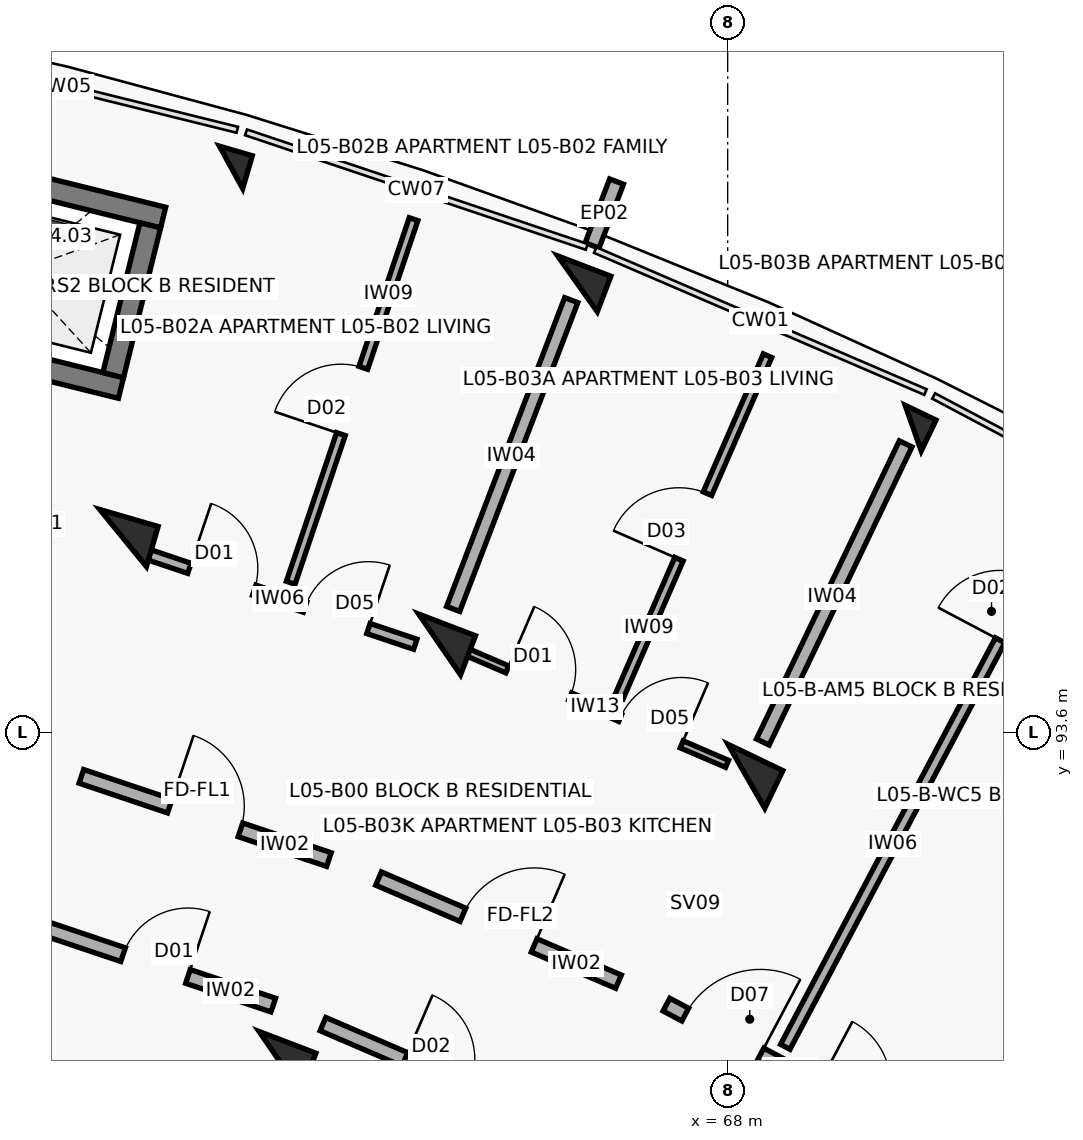
"""IFC4 building model, lengths in metres.
Left out: names, types, materials, properties, quantities, classifications, styles, units other than length and angle.
Written with IfcOpenShell. Run it as: python <this file> out.ifc"""

import sys

from ifc_helpers import new_model, si_unit, direction, frame, frame_2d, origin, origin_2d, place, context, subcontext, project, spatial, rectangle, extrude, element, fill, save


model = new_model("IFC4")
c1 = context("Model", 3, precision=1e-05, world=origin(), true_north=direction((0.0, 1.0)))
c2 = subcontext(c1, "Body", "Model", "MODEL_VIEW")
j1 = project(units=[si_unit("LENGTHUNIT", "METRE"), si_unit("PLANEANGLEUNIT", "RADIAN")], contexts=[c1])
p1 = place(None, origin())
s1 = spatial("IfcSite", under=j1, at=p1, CompositionType="ELEMENT")
p2 = place(p1, origin())
s2 = spatial("IfcBuilding", under=s1, at=p2, CompositionType="ELEMENT")
p3 = place(p2, frame((0.0, 0.0, 17.4)))
s3 = spatial("IfcBuildingStorey", under=s2, at=p3, CompositionType="ELEMENT", Elevation=17.4)
p4 = place(p3, frame((60.046, 96.153, 0.0), z_axis=(0.0, 0.0, 1.0), x_axis=(0.27966144946, 0.96009867914, 0.0)))
e1 = element("IfcColumn", 1, at=p4, inside=s3, PredefinedType="COLUMN", context=c2, shape_type="SweptSolid", body=[
    extrude(rectangle(XDim=0.55, YDim=0.8, at=origin_2d()), origin(), (0.0, 0.0, 1.0), 3.1),
])
p5 = place(p3, frame((61.467, 101.031, 0.0), z_axis=(0.0, 0.0, 1.0), x_axis=(0.27966144946, 0.96009867914, 0.0)))
e2 = element("IfcColumn", 2, at=p5, inside=s3, PredefinedType="COLUMN", context=c2, shape_type="SweptSolid", body=[
    extrude(rectangle(XDim=0.45, YDim=0.45, at=origin_2d()), origin(), (0.0, 0.0, 1.0), 3.1),
])
for number, where, z_axis, x_axis in (
    (3, (62.111, 89.261, 0.0), (0.0, 0.0, 1.0), (0.357, 0.934, 0.0)),
    (4, (64.21, 94.753, 0.0), (0.0, 0.0, 1.0), (0.357, 0.934, 0.0)),
):
    element("IfcColumn", number, at=place(p3, frame(where, z_axis=z_axis, x_axis=x_axis)), inside=s3, PredefinedType="COLUMN", context=c2, shape_type="SweptSolid", body=[
        extrude(rectangle(XDim=0.55, YDim=0.8, at=origin_2d()), origin(), (0.0, 0.0, 1.0), 3.1),
    ])
p6 = place(p3, frame((66.024, 99.499, 0.0), z_axis=(0.0, 0.0, 1.0), x_axis=(0.357064076459, 0.934079892355, 0.0)))
e5 = element("IfcColumn", 5, at=p6, inside=s3, PredefinedType="COLUMN", context=c2, shape_type="SweptSolid", body=[
    extrude(rectangle(XDim=0.5, YDim=0.75, at=origin_2d()), origin(), (0.0, 0.0, 1.0), 3.1),
])
p7 = place(p3, frame((68.246, 93.019, 0.0), z_axis=(0.0, 0.0, 1.0), x_axis=(0.432085748802, 0.901832526405, 0.0)))
e6 = element("IfcColumn", 6, at=p7, inside=s3, PredefinedType="COLUMN", context=c2, shape_type="SweptSolid", body=[
    extrude(rectangle(XDim=0.55, YDim=0.8, at=origin_2d()), origin(), (0.0, 0.0, 1.0), 3.1),
])
p8 = place(p3, frame((70.441, 97.6, 0.0), z_axis=(0.0, 0.0, 1.0), x_axis=(0.432085748802, 0.901832526405, 0.0)))
e7 = element("IfcColumn", 7, at=p8, inside=s3, PredefinedType="COLUMN", context=c2, shape_type="SweptSolid", body=[
    extrude(rectangle(XDim=0.45, YDim=0.45, at=origin_2d()), origin(), (0.0, 0.0, 1.0), 3.1),
])
p9 = place(p3, frame((66.217, 100.003, 0.0), z_axis=(0.0, 0.0, 1.0), x_axis=(0.356942580168, 0.934126326823, 0.0)))
e8 = element("IfcWall", 8, at=p9, inside=s3, PredefinedType="PARAPET", context=c2, shape_type="SweptSolid", body=[
    extrude(rectangle(XDim=0.9, YDim=0.195, at=frame_2d((0.45, 0.0))), origin(), (0.0, 0.0, 1.0), 2.25),
])
p10 = place(p3, frame((60.018, 98.128, 0.0), z_axis=(0.0, 0.0, 1.0), x_axis=(-0.970707542441, 0.240264160972, 0.0)))
e9 = element("IfcWall", 9, at=p10, inside=s3, PredefinedType="SHEAR", context=c2, shape_type="SweptSolid", body=[
    extrude(rectangle(XDim=3.39, YDim=0.28, at=frame_2d((1.695, 0.0))), origin(), (0.0, 0.0, 1.0), 3.1),
])
p11 = place(p10, frame((1.095, 0.0, 0.0)))
e10 = element("IfcOpeningElement", 10, at=p11, cuts=e9, PredefinedType="OPENING", context=c2, shape_type="SweptSolid", body=[
    extrude(rectangle(XDim=1.2, YDim=2.15, at=frame_2d((0.6, 1.075))), frame((0.0, 0.15, 0.0), z_axis=(0.0, -1.0, 0.0), x_axis=(1.0, 0.0, 0.0)), (0.0, 0.0, 1.0), 0.3),
])
p12 = place(p3, frame((60.573, 100.37, 0.0), z_axis=(0.0, 0.0, 1.0), x_axis=(-0.970711699588, 0.240247364777, 0.0)))
e11 = element("IfcWall", 11, at=p12, inside=s3, PredefinedType="SHEAR", context=c2, shape_type="SweptSolid", body=[
    extrude(rectangle(XDim=3.39, YDim=0.28, at=frame_2d((1.695, 0.0))), origin(), (0.0, 0.0, 1.0), 3.1),
])
p13 = place(p3, frame((59.915, 98.297, 0.0), z_axis=(0.0, 0.0, 1.0), x_axis=(0.2402993748, 0.970698825832, 0.0)))
e12 = element("IfcWall", 12, at=p13, inside=s3, PredefinedType="SHEAR", context=c2, shape_type="SweptSolid", body=[
    extrude(rectangle(XDim=2.03, YDim=0.28, at=frame_2d((1.015, 0.0))), origin(), (0.0, 0.0, 1.0), 3.1),
])
p14 = place(p3, frame((59.497, 93.018, 0.0), z_axis=(0.0, 0.0, 1.0), x_axis=(0.947863007629, -0.318678080151, 0.0)))
e13 = element("IfcWall", 13, at=p14, inside=s3, PredefinedType="SOLIDWALL", context=c2, shape_type="SweptSolid", body=[
    extrude(rectangle(XDim=3.436, YDim=0.19, at=frame_2d((1.718, 0.0))), origin(), (0.0, 0.0, 1.0), 2.08),
])
p15 = place(p14, frame((1.228, 0.0, 0.0)))
e14 = element("IfcOpeningElement", 14, at=p15, cuts=e13, PredefinedType="OPENING", context=c2, shape_type="SweptSolid", body=[
    extrude(rectangle(XDim=0.98, YDim=2.15, at=frame_2d((0.49, 1.075))), frame((0.0, 0.105, 0.0), z_axis=(0.0, -1.0, 0.0), x_axis=(1.0, 0.0, 0.0)), (0.0, 0.0, 1.0), 0.21),
])
p16 = place(p3, frame((58.923, 91.049, 0.0), z_axis=(0.0, 0.0, 1.0), x_axis=(0.94787351033, -0.318646839643, 0.0)))
e15 = element("IfcWall", 15, at=p16, inside=s3, PredefinedType="SOLIDWALL", context=c2, shape_type="SweptSolid", body=[
    extrude(rectangle(XDim=3.269, YDim=0.19, at=frame_2d((1.634, 0.0))), origin(), (0.0, 0.0, 1.0), 2.08),
])
p17 = place(p16, frame((1.184, 0.0, 0.0)))
e16 = element("IfcOpeningElement", 16, at=p17, cuts=e15, PredefinedType="OPENING", context=c2, shape_type="SweptSolid", body=[
    extrude(rectangle(XDim=0.9, YDim=2.1, at=frame_2d((0.45, 1.05))), frame((0.0, 0.105, 0.0), z_axis=(0.0, -1.0, 0.0), x_axis=(1.0, 0.0, 0.0)), (0.0, 0.0, 1.0), 0.21),
])
p18 = place(p3, frame((60.302, 95.962, 0.0), z_axis=(0.0, 0.0, 1.0), x_axis=(0.947873924847, -0.318645606584, 0.0)))
e17 = element("IfcWall", 17, at=p18, inside=s3, PredefinedType="PARTITIONING", context=c2, shape_type="SweptSolid", body=[
    extrude(rectangle(XDim=3.785, YDim=0.14, at=frame_2d((1.893, 0.0))), origin(), (0.0, 0.0, 1.0), 2.08),
])
p19 = place(p18, frame((0.65, 0.0, 0.0)))
e18 = element("IfcOpeningElement", 18, at=p19, cuts=e17, PredefinedType="OPENING", context=c2, shape_type="SweptSolid", body=[
    extrude(rectangle(XDim=0.9, YDim=2.1, at=frame_2d((0.45, 1.05))), frame((0.0, 0.08, 0.0), z_axis=(0.0, -1.0, 0.0), x_axis=(1.0, 0.0, 0.0)), (0.0, 0.0, 1.0), 0.16),
])
p20 = place(p18, frame((2.255, 0.0, 0.0)))
e19 = element("IfcOpeningElement", 19, at=p20, cuts=e17, PredefinedType="OPENING", context=c2, shape_type="SweptSolid", body=[
    extrude(rectangle(XDim=0.88, YDim=2.1, at=frame_2d((0.44, 1.05))), frame((0.0, 0.08, 0.0), z_axis=(0.0, -1.0, 0.0), x_axis=(1.0, 0.0, 0.0)), (0.0, 0.0, 1.0), 0.16),
])
p21 = place(p3, frame((62.251, 95.565, 0.0), z_axis=(0.0, 0.0, 1.0), x_axis=(0.32008297059, 0.94738951437, 0.0)))
e20 = element("IfcWall", 20, at=p21, inside=s3, PredefinedType="PARTITIONING", context=c2, shape_type="SweptSolid", body=[
    extrude(rectangle(XDim=5.05, YDim=0.12, at=frame_2d((2.525, 0.0))), origin(), (0.0, 0.0, 1.0), 2.08),
])
p22 = place(p21, frame((2.065, 0.0, 0.0)))
e21 = element("IfcOpeningElement", 21, at=p22, cuts=e20, PredefinedType="OPENING", context=c2, shape_type="SweptSolid", body=[
    extrude(rectangle(XDim=0.92, YDim=2.1, at=frame_2d((0.46, 1.05))), frame((0.0, 0.07, 0.0), z_axis=(0.0, -1.0, 0.0), x_axis=(1.0, 0.0, 0.0)), (0.0, 0.0, 1.0), 0.14),
])
p23 = place(p3, frame((63.407, 91.673, 0.0), z_axis=(0.0, 0.0, 1.0), x_axis=(0.918718172399, -0.394913813008, 0.0)))
e22 = element("IfcWall", 22, at=p23, inside=s3, PredefinedType="SOLIDWALL", context=c2, shape_type="SweptSolid", body=[
    extrude(rectangle(XDim=3.436, YDim=0.19, at=frame_2d((1.718, 0.0))), origin(), (0.0, 0.0, 1.0), 2.08),
])
p24 = place(p23, frame((1.208, 0.0, 0.0)))
e23 = element("IfcOpeningElement", 23, at=p24, cuts=e22, PredefinedType="OPENING", context=c2, shape_type="SweptSolid", body=[
    extrude(rectangle(XDim=1.02, YDim=2.15, at=frame_2d((0.51, 1.075))), frame((0.0, 0.105, 0.0), z_axis=(0.0, -1.0, 0.0), x_axis=(1.0, 0.0, 0.0)), (0.0, 0.0, 1.0), 0.21),
])
p25 = place(p3, frame((62.675, 89.758, 0.0), z_axis=(0.0, 0.0, 1.0), x_axis=(0.918723391052, -0.394901672235, 0.0)))
e24 = element("IfcWall", 24, at=p25, inside=s3, PredefinedType="SOLIDWALL", context=c2, shape_type="SweptSolid", body=[
    extrude(rectangle(XDim=3.269, YDim=0.19, at=frame_2d((1.634, 0.0))), origin(), (0.0, 0.0, 1.0), 2.08),
])
p26 = place(p25, frame((1.174, 0.0, 0.0)))
e25 = element("IfcOpeningElement", 25, at=p26, cuts=e24, PredefinedType="OPENING", context=c2, shape_type="SweptSolid", body=[
    extrude(rectangle(XDim=0.92, YDim=2.1, at=frame_2d((0.46, 1.05))), frame((0.0, 0.105, 0.0), z_axis=(0.0, -1.0, 0.0), x_axis=(1.0, 0.0, 0.0)), (0.0, 0.0, 1.0), 0.21),
])
p27 = place(p3, frame((64.503, 94.682, 0.0), z_axis=(0.0, 0.0, 1.0), x_axis=(0.918732171064, -0.394881245253, 0.0)))
e26 = element("IfcWall", 26, at=p27, inside=s3, PredefinedType="PARTITIONING", context=c2, shape_type="SweptSolid", body=[
    extrude(rectangle(XDim=3.797, YDim=0.1, at=frame_2d((1.899, 0.0))), origin(), (0.0, 0.0, 1.0), 2.08),
])
p28 = place(p27, frame((0.65, 0.0, 0.0)))
e27 = element("IfcOpeningElement", 27, at=p28, cuts=e26, PredefinedType="OPENING", context=c2, shape_type="SweptSolid", body=[
    extrude(rectangle(XDim=0.9, YDim=2.1, at=frame_2d((0.45, 1.05))), frame((0.0, 0.06, 0.0), z_axis=(0.0, -1.0, 0.0), x_axis=(1.0, 0.0, 0.0)), (0.0, 0.0, 1.0), 0.12),
])
p29 = place(p27, frame((2.267, 0.0, 0.0)))
e28 = element("IfcOpeningElement", 28, at=p29, cuts=e26, PredefinedType="OPENING", context=c2, shape_type="SweptSolid", body=[
    extrude(rectangle(XDim=0.88, YDim=2.1, at=frame_2d((0.44, 1.05))), frame((0.0, 0.06, 0.0), z_axis=(0.0, -1.0, 0.0), x_axis=(1.0, 0.0, 0.0)), (0.0, 0.0, 1.0), 0.12),
])
p30 = place(p3, frame((66.569, 94.06, 0.0), z_axis=(0.0, 0.0, 1.0), x_axis=(0.399048563147, 0.916929792433, 0.0)))
e29 = element("IfcWall", 29, at=p30, inside=s3, PredefinedType="PARTITIONING", context=c2, shape_type="SweptSolid", body=[
    extrude(rectangle(XDim=4.9, YDim=0.12, at=frame_2d((2.45, 0.0))), origin(), (0.0, 0.0, 1.0), 2.08),
])
p31 = place(p30, frame((1.98, 0.0, 0.0)))
e30 = element("IfcOpeningElement", 30, at=p31, cuts=e29, PredefinedType="OPENING", context=c2, shape_type="SweptSolid", body=[
    extrude(rectangle(XDim=0.94, YDim=2.1, at=frame_2d((0.47, 1.05))), frame((0.0, 0.07, 0.0), z_axis=(0.0, -1.0, 0.0), x_axis=(1.0, 0.0, 0.0)), (0.0, 0.0, 1.0), 0.14),
])
p32 = place(p3, frame((64.389, 95.22, 0.0), z_axis=(0.0, 0.0, 1.0), x_axis=(0.357064016205, 0.934079915388, 0.0)))
e31 = element("IfcWall", 31, at=p32, inside=s3, PredefinedType="SOLIDWALL", context=c2, shape_type="SweptSolid", body=[
    extrude(rectangle(XDim=4.35, YDim=0.185, at=frame_2d((2.175, 0.0))), origin(), (0.0, 0.0, 1.0), 2.08),
])
p33 = place(p3, frame((67.194, 90.014, 0.0), z_axis=(0.0, 0.0, 1.0), x_axis=(0.883410853063, -0.468599258099, 0.0)))
e32 = element("IfcWall", 32, at=p33, inside=s3, PredefinedType="SOLIDWALL", context=c2, shape_type="SweptSolid", body=[
    extrude(rectangle(XDim=3.436, YDim=0.19, at=frame_2d((1.718, 0.0))), origin(), (0.0, 0.0, 1.0), 2.08),
])
p34 = place(p33, frame((0.28, 0.0, 0.0)))
e33 = element("IfcOpeningElement", 33, at=p34, cuts=e32, PredefinedType="OPENING", context=c2, shape_type="SweptSolid", body=[
    extrude(rectangle(XDim=1.12, YDim=2.15, at=frame_2d((0.56, 1.075))), frame((0.0, 0.105, 0.0), z_axis=(0.0, -1.0, 0.0), x_axis=(1.0, 0.0, 0.0)), (0.0, 0.0, 1.0), 0.21),
])
p35 = place(p33, frame((2.266, 0.0, 0.0)))
e34 = element("IfcOpeningElement", 34, at=p35, cuts=e32, PredefinedType="OPENING", context=c2, shape_type="SweptSolid", body=[
    extrude(rectangle(XDim=0.95, YDim=2.1, at=frame_2d((0.475, 1.05))), frame((0.0, 0.105, 0.0), z_axis=(0.0, -1.0, 0.0), x_axis=(1.0, 0.0, 0.0)), (0.0, 0.0, 1.0), 0.21),
])
p36 = place(p3, frame((68.758, 89.459, 0.0), z_axis=(0.0, 0.0, 1.0), x_axis=(0.467208910392, 0.884146952746, 0.0)))
e35 = element("IfcWall", 35, at=p36, inside=s3, PredefinedType="PARTITIONING", context=c2, shape_type="SweptSolid", body=[
    extrude(rectangle(XDim=7.95, YDim=0.14, at=frame_2d((3.975, 0.0))), origin(), (0.0, 0.0, 1.0), 2.08),
])
p37 = place(p36, frame((6.05, 0.0, 0.0)))
e36 = element("IfcOpeningElement", 36, at=p37, cuts=e35, PredefinedType="OPENING", context=c2, shape_type="SweptSolid", body=[
    extrude(rectangle(XDim=0.92, YDim=2.1, at=frame_2d((0.46, 1.05))), frame((0.0, 0.08, 0.0), z_axis=(0.0, -1.0, 0.0), x_axis=(1.0, 0.0, 0.0)), (0.0, 0.0, 1.0), 0.16),
])
p38 = place(p3, frame((68.462, 93.469, 0.0), z_axis=(0.0, 0.0, 1.0), x_axis=(0.432086898897, 0.901831975371, 0.0)))
e37 = element("IfcWall", 37, at=p38, inside=s3, PredefinedType="SOLIDWALL", context=c2, shape_type="SweptSolid", body=[
    extrude(rectangle(XDim=4.35, YDim=0.185, at=frame_2d((2.175, 0.0))), origin(), (0.0, 0.0, 1.0), 2.08),
])
p39 = place(p15, origin())
e38 = element("IfcDoor", 38, at=p39, inside=s3, OperationType="SINGLE_SWING_LEFT", PredefinedType="DOOR", context=c2, shape_type="SweptSolid", body=[
    extrude(rectangle(XDim=0.98, YDim=2.15, at=frame_2d((0.49, 1.075))), frame((0.0, 0.025, 0.0), z_axis=(0.0, -1.0, 0.0), x_axis=(1.0, 0.0, 0.0)), (0.0, 0.0, 1.0), 0.05),
])
fill(e14, e38)
p40 = place(p17, origin())
e39 = element("IfcDoor", 39, at=p40, inside=s3, OperationType="SINGLE_SWING_RIGHT", PredefinedType="DOOR", context=c2, shape_type="SweptSolid", body=[
    extrude(rectangle(XDim=0.9, YDim=2.1, at=frame_2d((0.45, 1.05))), frame((0.0, 0.025, 0.0), z_axis=(0.0, -1.0, 0.0), x_axis=(1.0, 0.0, 0.0)), (0.0, 0.0, 1.0), 0.05),
])
fill(e16, e39)
p41 = place(p19, origin())
e40 = element("IfcDoor", 40, at=p41, inside=s3, OperationType="SINGLE_SWING_LEFT", PredefinedType="DOOR", context=c2, shape_type="SweptSolid", body=[
    extrude(rectangle(XDim=0.9, YDim=2.1, at=frame_2d((0.45, 1.05))), frame((0.0, 0.025, 0.0), z_axis=(0.0, -1.0, 0.0), x_axis=(1.0, 0.0, 0.0)), (0.0, 0.0, 1.0), 0.05),
])
fill(e18, e40)
p42 = place(p20, origin())
e41 = element("IfcDoor", 41, at=p42, inside=s3, OperationType="SINGLE_SWING_RIGHT", PredefinedType="DOOR", context=c2, shape_type="SweptSolid", body=[
    extrude(rectangle(XDim=0.88, YDim=2.1, at=frame_2d((0.44, 1.05))), frame((0.0, 0.025, 0.0), z_axis=(0.0, -1.0, 0.0), x_axis=(1.0, 0.0, 0.0)), (0.0, 0.0, 1.0), 0.05),
])
fill(e19, e41)
p43 = place(p22, origin())
e42 = element("IfcDoor", 42, at=p43, inside=s3, OperationType="SINGLE_SWING_LEFT", PredefinedType="DOOR", context=c2, shape_type="SweptSolid", body=[
    extrude(rectangle(XDim=0.92, YDim=2.1, at=frame_2d((0.46, 1.05))), frame((0.0, 0.025, 0.0), z_axis=(0.0, -1.0, 0.0), x_axis=(1.0, 0.0, 0.0)), (0.0, 0.0, 1.0), 0.05),
])
fill(e21, e42)
p44 = place(p24, origin())
e43 = element("IfcDoor", 43, at=p44, inside=s3, OperationType="SINGLE_SWING_RIGHT", PredefinedType="DOOR", context=c2, shape_type="SweptSolid", body=[
    extrude(rectangle(XDim=1.02, YDim=2.15, at=frame_2d((0.51, 1.075))), frame((0.0, 0.025, 0.0), z_axis=(0.0, -1.0, 0.0), x_axis=(1.0, 0.0, 0.0)), (0.0, 0.0, 1.0), 0.05),
])
fill(e23, e43)
p45 = place(p26, origin())
e44 = element("IfcDoor", 44, at=p45, inside=s3, OperationType="SINGLE_SWING_LEFT", PredefinedType="DOOR", context=c2, shape_type="SweptSolid", body=[
    extrude(rectangle(XDim=0.92, YDim=2.1, at=frame_2d((0.46, 1.05))), frame((0.0, 0.025, 0.0), z_axis=(0.0, -1.0, 0.0), x_axis=(1.0, 0.0, 0.0)), (0.0, 0.0, 1.0), 0.05),
])
fill(e25, e44)
p46 = place(p28, origin())
e45 = element("IfcDoor", 45, at=p46, inside=s3, OperationType="SINGLE_SWING_LEFT", PredefinedType="DOOR", context=c2, shape_type="SweptSolid", body=[
    extrude(rectangle(XDim=0.9, YDim=2.1, at=frame_2d((0.45, 1.05))), frame((0.0, 0.025, 0.0), z_axis=(0.0, -1.0, 0.0), x_axis=(1.0, 0.0, 0.0)), (0.0, 0.0, 1.0), 0.05),
])
fill(e27, e45)
p47 = place(p29, origin())
e46 = element("IfcDoor", 46, at=p47, inside=s3, OperationType="SINGLE_SWING_RIGHT", PredefinedType="DOOR", context=c2, shape_type="SweptSolid", body=[
    extrude(rectangle(XDim=0.88, YDim=2.1, at=frame_2d((0.44, 1.05))), frame((0.0, 0.025, 0.0), z_axis=(0.0, -1.0, 0.0), x_axis=(1.0, 0.0, 0.0)), (0.0, 0.0, 1.0), 0.05),
])
fill(e28, e46)
p48 = place(p31, origin())
e47 = element("IfcDoor", 47, at=p48, inside=s3, OperationType="SINGLE_SWING_LEFT", PredefinedType="DOOR", context=c2, shape_type="SweptSolid", body=[
    extrude(rectangle(XDim=0.94, YDim=2.1, at=frame_2d((0.47, 1.05))), frame((0.0, 0.025, 0.0), z_axis=(0.0, -1.0, 0.0), x_axis=(1.0, 0.0, 0.0)), (0.0, 0.0, 1.0), 0.05),
])
fill(e30, e47)
p49 = place(p34, origin())
e48 = element("IfcDoor", 48, at=p49, inside=s3, OperationType="SINGLE_SWING_RIGHT", PredefinedType="DOOR", context=c2, shape_type="SweptSolid", body=[
    extrude(rectangle(XDim=1.12, YDim=2.15, at=frame_2d((0.56, 1.075))), frame((0.0, 0.025, 0.0), z_axis=(0.0, -1.0, 0.0), x_axis=(1.0, 0.0, 0.0)), (0.0, 0.0, 1.0), 0.05),
])
fill(e33, e48)
p50 = place(p37, origin())
e49 = element("IfcDoor", 49, at=p50, inside=s3, OperationType="SINGLE_SWING_LEFT", PredefinedType="DOOR", context=c2, shape_type="SweptSolid", body=[
    extrude(rectangle(XDim=0.92, YDim=2.1, at=frame_2d((0.46, 1.05))), frame((0.0, 0.025, 0.0), z_axis=(0.0, -1.0, 0.0), x_axis=(1.0, 0.0, 0.0)), (0.0, 0.0, 1.0), 0.05),
])
fill(e36, e49)
save(model, sys.argv[1])
